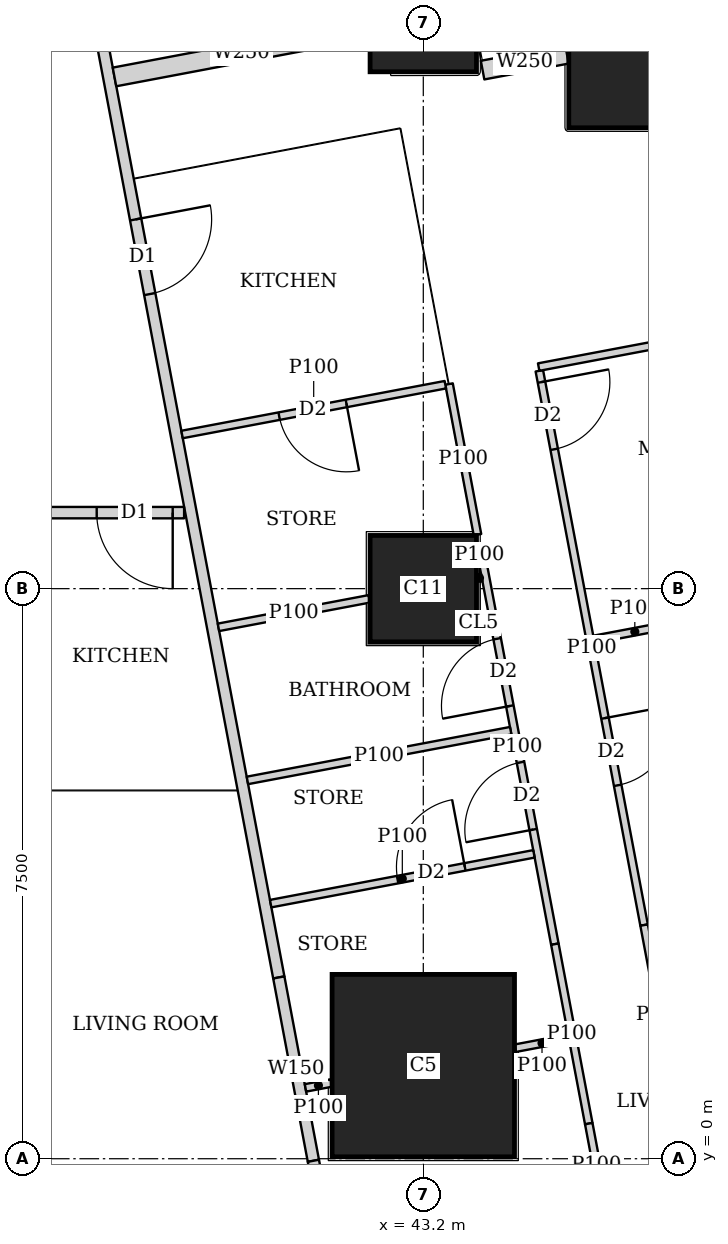
"""IFC4 building model, lengths in metres.
Left out: names, types, materials, properties, quantities, classifications, styles, units other than length and angle.
Written with IfcOpenShell. Run it as: python <this file> out.ifc"""

import sys

from ifc_helpers import new_model, si_unit, direction, frame, frame_2d, origin, origin_2d, place, context, subcontext, project, spatial, rectangle, extrude, element, fill, save


model = new_model("IFC4")
c1 = context("Model", 3, precision=1e-05, world=origin(), true_north=direction((0.0, 1.0)))
c2 = subcontext(c1, "Body", "Model", "MODEL_VIEW")
j1 = project(units=[si_unit("LENGTHUNIT", "METRE"), si_unit("PLANEANGLEUNIT", "RADIAN")], contexts=[c1])
p1 = place(None, origin())
s1 = spatial("IfcSite", under=j1, at=p1, CompositionType="ELEMENT")
p2 = place(p1, origin())
s2 = spatial("IfcBuilding", under=s1, at=p2, CompositionType="ELEMENT")
p3 = place(p2, frame((0.0, 0.0, 208.7)))
s3 = spatial("IfcBuildingStorey", under=s2, at=p3, CompositionType="ELEMENT", Elevation=208.7)
p4 = place(p3, frame((43.2, 1.225, 0.0), z_axis=(0.0, 0.0, 1.0), x_axis=(1.0, 0.0, 0.0)))
e1 = element("IfcColumn", 1, at=p4, inside=s3, PredefinedType="COLUMN", context=c2, shape_type="SweptSolid", body=[
    extrude(rectangle(XDim=2.4, YDim=2.4, at=origin_2d()), origin(), (0.0, 0.0, 1.0), 3.75),
])
for number, where, z_axis, x_axis in (
    (2, (43.2, 7.5, 0.0), (0.0, 0.0, 1.0), (1.0, 0.0, 0.0)),
    (3, (43.2, 15.0, 0.0), (0.0, 0.0, 1.0), (1.0, 0.0, 0.0)),
):
    element("IfcColumn", number, at=place(p3, frame(where, z_axis=z_axis, x_axis=x_axis)), inside=s3, PredefinedType="COLUMN", context=c2, shape_type="SweptSolid", body=[
        extrude(rectangle(XDim=1.4, YDim=1.4, at=origin_2d()), origin(), (0.0, 0.0, 1.0), 3.75),
    ])
p5 = place(p3, frame((46.314, 14.763, 0.0), z_axis=(0.0, 0.0, 1.0), x_axis=(1.0, 0.0, 0.0)))
e4 = element("IfcColumn", 4, at=p5, inside=s3, PredefinedType="COLUMN", context=c2, shape_type="SweptSolid", body=[
    extrude(rectangle(XDim=2.4, YDim=2.4, at=origin_2d()), origin(), (0.0, 0.0, 1.0), 3.75),
])
p6 = place(p3, frame((50.653, 2.703, 0.0), z_axis=(0.0, 0.0, 1.0), x_axis=(-0.185612026696, 0.982623109613, 0.0)))
e5 = element("IfcWall", 5, at=p6, inside=s3, PredefinedType="SOLIDWALL", context=c2, shape_type="SweptSolid", body=[
    extrude(rectangle(XDim=41.393, YDim=0.2, at=frame_2d((20.697, 0.0))), origin(), (0.0, 0.0, 1.0), 3.5),
])
p7 = place(p6, frame((1.633, 0.0, 0.9)))
e6 = element("IfcOpeningElement", 6, at=p7, cuts=e5, PredefinedType="OPENING", context=c2, shape_type="SweptSolid", body=[
    extrude(rectangle(XDim=1.8, YDim=1.5, at=frame_2d((0.9, 0.75))), frame((0.0, 0.11, 0.0), z_axis=(0.0, -1.0, 0.0), x_axis=(1.0, 0.0, 0.0)), (0.0, 0.0, 1.0), 0.22),
])
p8 = place(p6, frame((6.032, 0.0, 0.9)))
e7 = element("IfcOpeningElement", 7, at=p8, cuts=e5, PredefinedType="OPENING", context=c2, shape_type="SweptSolid", body=[
    extrude(rectangle(XDim=1.8, YDim=1.5, at=frame_2d((0.9, 0.75))), frame((0.0, 0.11, 0.0), z_axis=(0.0, -1.0, 0.0), x_axis=(1.0, 0.0, 0.0)), (0.0, 0.0, 1.0), 0.22),
])
p9 = place(p6, frame((9.848, 0.0, 0.9)))
e8 = element("IfcOpeningElement", 8, at=p9, cuts=e5, PredefinedType="OPENING", context=c2, shape_type="SweptSolid", body=[
    extrude(rectangle(XDim=1.8, YDim=1.5, at=frame_2d((0.9, 0.75))), frame((0.0, 0.11, 0.0), z_axis=(0.0, -1.0, 0.0), x_axis=(1.0, 0.0, 0.0)), (0.0, 0.0, 1.0), 0.22),
])
p10 = place(p6, frame((13.664, 0.0, 0.9)))
e9 = element("IfcOpeningElement", 9, at=p10, cuts=e5, PredefinedType="OPENING", context=c2, shape_type="SweptSolid", body=[
    extrude(rectangle(XDim=1.8, YDim=1.5, at=frame_2d((0.9, 0.75))), frame((0.0, 0.11, 0.0), z_axis=(0.0, -1.0, 0.0), x_axis=(1.0, 0.0, 0.0)), (0.0, 0.0, 1.0), 0.22),
])
p11 = place(p6, frame((17.481, 0.0, 0.9)))
e10 = element("IfcOpeningElement", 10, at=p11, cuts=e5, PredefinedType="OPENING", context=c2, shape_type="SweptSolid", body=[
    extrude(rectangle(XDim=1.8, YDim=1.5, at=frame_2d((0.9, 0.75))), frame((0.0, 0.11, 0.0), z_axis=(0.0, -1.0, 0.0), x_axis=(1.0, 0.0, 0.0)), (0.0, 0.0, 1.0), 0.22),
])
p12 = place(p6, frame((21.297, 0.0, 0.9)))
e11 = element("IfcOpeningElement", 11, at=p12, cuts=e5, PredefinedType="OPENING", context=c2, shape_type="SweptSolid", body=[
    extrude(rectangle(XDim=1.8, YDim=1.5, at=frame_2d((0.9, 0.75))), frame((0.0, 0.11, 0.0), z_axis=(0.0, -1.0, 0.0), x_axis=(1.0, 0.0, 0.0)), (0.0, 0.0, 1.0), 0.22),
])
p13 = place(p6, frame((25.113, 0.0, 0.9)))
e12 = element("IfcOpeningElement", 12, at=p13, cuts=e5, PredefinedType="OPENING", context=c2, shape_type="SweptSolid", body=[
    extrude(rectangle(XDim=1.8, YDim=1.5, at=frame_2d((0.9, 0.75))), frame((0.0, 0.11, 0.0), z_axis=(0.0, -1.0, 0.0), x_axis=(1.0, 0.0, 0.0)), (0.0, 0.0, 1.0), 0.22),
])
p14 = place(p6, frame((28.93, 0.0, 0.9)))
e13 = element("IfcOpeningElement", 13, at=p14, cuts=e5, PredefinedType="OPENING", context=c2, shape_type="SweptSolid", body=[
    extrude(rectangle(XDim=1.8, YDim=1.5, at=frame_2d((0.9, 0.75))), frame((0.0, 0.11, 0.0), z_axis=(0.0, -1.0, 0.0), x_axis=(1.0, 0.0, 0.0)), (0.0, 0.0, 1.0), 0.22),
])
p15 = place(p6, frame((32.746, 0.0, 0.9)))
e14 = element("IfcOpeningElement", 14, at=p15, cuts=e5, PredefinedType="OPENING", context=c2, shape_type="SweptSolid", body=[
    extrude(rectangle(XDim=1.8, YDim=1.5, at=frame_2d((0.9, 0.75))), frame((0.0, 0.11, 0.0), z_axis=(0.0, -1.0, 0.0), x_axis=(1.0, 0.0, 0.0)), (0.0, 0.0, 1.0), 0.22),
])
p16 = place(p6, frame((36.481, 0.0, 0.9)))
e15 = element("IfcOpeningElement", 15, at=p16, cuts=e5, PredefinedType="OPENING", context=c2, shape_type="SweptSolid", body=[
    extrude(rectangle(XDim=1.8, YDim=1.5, at=frame_2d((0.9, 0.75))), frame((0.0, 0.11, 0.0), z_axis=(0.0, -1.0, 0.0), x_axis=(1.0, 0.0, 0.0)), (0.0, 0.0, 1.0), 0.22),
])
p17 = place(p3, frame((40.053, 8.5, 0.0), z_axis=(0.0, 0.0, 1.0), x_axis=(-1.0, 0.0, 0.0)))
e16 = element("IfcWall", 16, at=p17, inside=s3, PredefinedType="SOLIDWALL", context=c2, shape_type="SweptSolid", body=[
    extrude(rectangle(XDim=31.052, YDim=0.15, at=frame_2d((15.526, 0.0))), origin(), (0.0, 0.0, 1.0), 3.5),
])
p18 = place(p17, frame((29.178, 0.0, 0.0)))
e17 = element("IfcOpeningElement", 17, at=p18, cuts=e16, PredefinedType="OPENING", context=c2, shape_type="SweptSolid", body=[
    extrude(rectangle(XDim=1.0, YDim=2.1, at=frame_2d((0.5, 1.05))), frame((0.0, 0.085, 0.0), z_axis=(0.0, -1.0, 0.0), x_axis=(1.0, 0.0, 0.0)), (0.0, 0.0, 1.0), 0.17),
])
p19 = place(p17, frame((19.953, 0.0, 0.0)))
e18 = element("IfcOpeningElement", 18, at=p19, cuts=e16, PredefinedType="OPENING", context=c2, shape_type="SweptSolid", body=[
    extrude(rectangle(XDim=1.0, YDim=2.1, at=frame_2d((0.5, 1.05))), frame((0.0, 0.085, 0.0), z_axis=(0.0, -1.0, 0.0), x_axis=(1.0, 0.0, 0.0)), (0.0, 0.0, 1.0), 0.17),
])
p20 = place(p17, frame((12.753, 0.0, 0.0)))
e19 = element("IfcOpeningElement", 19, at=p20, cuts=e16, PredefinedType="OPENING", context=c2, shape_type="SweptSolid", body=[
    extrude(rectangle(XDim=1.0, YDim=2.1, at=frame_2d((0.5, 1.05))), frame((0.0, 0.085, 0.0), z_axis=(0.0, -1.0, 0.0), x_axis=(1.0, 0.0, 0.0)), (0.0, 0.0, 1.0), 0.17),
])
p21 = place(p17, frame((0.15, 0.0, 0.0)))
e20 = element("IfcOpeningElement", 20, at=p21, cuts=e16, PredefinedType="OPENING", context=c2, shape_type="SweptSolid", body=[
    extrude(rectangle(XDim=1.0, YDim=2.1, at=frame_2d((0.5, 1.05))), frame((0.0, 0.085, 0.0), z_axis=(0.0, -1.0, 0.0), x_axis=(1.0, 0.0, 0.0)), (0.0, 0.0, 1.0), 0.17),
])
p22 = place(p3, frame((33.68, 42.723, 0.0), z_axis=(0.0, 0.0, 1.0), x_axis=(0.185601160014, -0.982625162207, 0.0)))
e21 = element("IfcWall", 21, at=p22, inside=s3, PredefinedType="SOLIDWALL", context=c2, shape_type="SweptSolid", body=[
    extrude(rectangle(XDim=41.051, YDim=0.15, at=frame_2d((20.526, 0.0))), origin(), (0.0, 0.0, 1.0), 2.5),
])
p23 = place(p22, frame((12.307, 0.0, 0.0)))
e22 = element("IfcOpeningElement", 22, at=p23, cuts=e21, PredefinedType="OPENING", context=c2, shape_type="SweptSolid", body=[
    extrude(rectangle(XDim=1.0, YDim=2.1, at=frame_2d((0.5, 1.05))), frame((0.0, 0.085, 0.0), z_axis=(0.0, -1.0, 0.0), x_axis=(1.0, 0.0, 0.0)), (0.0, 0.0, 1.0), 0.17),
])
p24 = place(p22, frame((16.123, 0.0, 0.0)))
e23 = element("IfcOpeningElement", 23, at=p24, cuts=e21, PredefinedType="OPENING", context=c2, shape_type="SweptSolid", body=[
    extrude(rectangle(XDim=1.0, YDim=2.1, at=frame_2d((0.5, 1.05))), frame((0.0, 0.085, 0.0), z_axis=(0.0, -1.0, 0.0), x_axis=(1.0, 0.0, 0.0)), (0.0, 0.0, 1.0), 0.17),
])
p25 = place(p22, frame((30.902, 0.0, 0.0)))
e24 = element("IfcOpeningElement", 24, at=p25, cuts=e21, PredefinedType="OPENING", context=c2, shape_type="SweptSolid", body=[
    extrude(rectangle(XDim=1.0, YDim=2.1, at=frame_2d((0.5, 1.05))), frame((0.0, 0.085, 0.0), z_axis=(0.0, -1.0, 0.0), x_axis=(1.0, 0.0, 0.0)), (0.0, 0.0, 1.0), 0.17),
])
p26 = place(p3, frame((41.299, 2.385, 0.0), z_axis=(0.0, 0.0, 1.0), x_axis=(0.18529731833, -0.982682504077, 0.0)))
e25 = element("IfcWall", 25, at=p26, inside=s3, PredefinedType="SOLIDWALL", context=c2, shape_type="SweptSolid", body=[
    extrude(rectangle(XDim=2.455, YDim=0.15, at=frame_2d((1.227, 0.0))), origin(), (0.0, 0.0, 1.0), 2.05),
])
p27 = place(p3, frame((41.754, -0.027, 0.0), z_axis=(0.0, 0.0, 1.0), x_axis=(0.186404157015, -0.982473149886, 0.0)))
e26 = element("IfcWall", 26, at=p27, inside=s3, PredefinedType="SOLIDWALL", context=c2, shape_type="SweptSolid", body=[
    extrude(rectangle(XDim=0.634, YDim=0.15, at=frame_2d((0.317, 0.0))), origin(), (0.0, 0.0, 1.0), 3.5),
])
p28 = place(p3, frame((44.727, 10.366, 0.0), z_axis=(0.0, 0.0, 1.0), x_axis=(0.185678775129, -0.982610498858, 0.0)))
e27 = element("IfcWall", 27, at=p28, inside=s3, PredefinedType="PARTITIONING", context=c2, shape_type="SweptSolid", body=[
    extrude(rectangle(XDim=7.421, YDim=0.1, at=frame_2d((3.71, 0.0))), origin(), (0.0, 0.0, 1.0), 3.5),
])
p29 = place(p28, frame((0.151, 0.0, 0.0)))
e28 = element("IfcOpeningElement", 28, at=p29, cuts=e27, PredefinedType="OPENING", context=c2, shape_type="SweptSolid", body=[
    extrude(rectangle(XDim=0.9, YDim=2.1, at=frame_2d((0.45, 1.05))), frame((0.0, 0.06, 0.0), z_axis=(0.0, -1.0, 0.0), x_axis=(1.0, 0.0, 0.0)), (0.0, 0.0, 1.0), 0.12),
])
p30 = place(p28, frame((4.65, 0.0, 0.0)))
e29 = element("IfcOpeningElement", 29, at=p30, cuts=e27, PredefinedType="OPENING", context=c2, shape_type="SweptSolid", body=[
    extrude(rectangle(XDim=0.9, YDim=2.1, at=frame_2d((0.45, 1.05))), frame((0.0, 0.06, 0.0), z_axis=(0.0, -1.0, 0.0), x_axis=(1.0, 0.0, 0.0)), (0.0, 0.0, 1.0), 0.12),
])
p31 = place(p3, frame((46.105, 3.074, 0.0), z_axis=(0.0, 0.0, 1.0), x_axis=(0.185631845838, -0.982619365681, 0.0)))
e30 = element("IfcWall", 30, at=p31, inside=s3, PredefinedType="PARTITIONING", context=c2, shape_type="SweptSolid", body=[
    extrude(rectangle(XDim=2.403, YDim=0.1, at=frame_2d((1.201, 0.0))), origin(), (0.0, 0.0, 1.0), 2.05),
])
p32 = place(p3, frame((43.539, 10.192, 0.0), z_axis=(0.0, 0.0, 1.0), x_axis=(0.185443145218, -0.982654995353, 0.0)))
e31 = element("IfcWall", 31, at=p32, inside=s3, PredefinedType="PARTITIONING", context=c2, shape_type="SweptSolid", body=[
    extrude(rectangle(XDim=2.017, YDim=0.1, at=frame_2d((1.008, 0.0))), origin(), (0.0, 0.0, 1.0), 3.5),
])
p33 = place(p3, frame((43.949, 8.02, 0.0), z_axis=(0.0, 0.0, 1.0), x_axis=(0.185656792073, -0.982614652627, 0.0)))
e32 = element("IfcWall", 32, at=p33, inside=s3, PredefinedType="PARTITIONING", context=c2, shape_type="SweptSolid", body=[
    extrude(rectangle(XDim=5.289, YDim=0.1, at=frame_2d((2.645, 0.0))), origin(), (0.0, 0.0, 1.0), 3.5),
])
p34 = place(p33, frame((1.2, 0.0, 0.0)))
e33 = element("IfcOpeningElement", 33, at=p34, cuts=e32, PredefinedType="OPENING", context=c2, shape_type="SweptSolid", body=[
    extrude(rectangle(XDim=0.9, YDim=2.1, at=frame_2d((0.45, 1.05))), frame((0.0, 0.06, 0.0), z_axis=(0.0, -1.0, 0.0), x_axis=(1.0, 0.0, 0.0)), (0.0, 0.0, 1.0), 0.12),
])
p35 = place(p33, frame((2.855, 0.0, 0.0)))
e34 = element("IfcOpeningElement", 34, at=p35, cuts=e32, PredefinedType="OPENING", context=c2, shape_type="SweptSolid", body=[
    extrude(rectangle(XDim=0.9, YDim=2.1, at=frame_2d((0.45, 1.05))), frame((0.0, 0.06, 0.0), z_axis=(0.0, -1.0, 0.0), x_axis=(1.0, 0.0, 0.0)), (0.0, 0.0, 1.0), 0.12),
])
p36 = place(p3, frame((44.931, 2.823, 0.0), z_axis=(0.0, 0.0, 1.0), x_axis=(0.185631845838, -0.982619365681, 0.0)))
e35 = element("IfcWall", 35, at=p36, inside=s3, PredefinedType="PARTITIONING", context=c2, shape_type="SweptSolid", body=[
    extrude(rectangle(XDim=2.403, YDim=0.1, at=frame_2d((1.201, 0.0))), origin(), (0.0, 0.0, 1.0), 2.05),
])
p37 = place(p3, frame((45.377, 0.462, 0.0), z_axis=(0.0, 0.0, 1.0), x_axis=(0.185513480919, -0.982641719243, 0.0)))
e36 = element("IfcWall", 36, at=p37, inside=s3, PredefinedType="PARTITIONING", context=c2, shape_type="SweptSolid", body=[
    extrude(rectangle(XDim=1.095, YDim=0.1, at=frame_2d((0.547, 0.0))), origin(), (0.0, 0.0, 1.0), 3.5),
])
p38 = place(p3, frame((48.943, 11.213, 0.0), z_axis=(0.0, 0.0, 1.0), x_axis=(-0.982633535512, -0.185556823879, 0.0)))
e37 = element("IfcWall", 37, at=p38, inside=s3, PredefinedType="PARTITIONING", context=c2, shape_type="SweptSolid", body=[
    extrude(rectangle(XDim=4.3, YDim=0.1, at=frame_2d((2.15, 0.0))), origin(), (0.0, 0.0, 1.0), 2.05),
])
p39 = place(p3, frame((46.52, 7.035, 0.0), z_axis=(0.0, 0.0, 1.0), x_axis=(-0.982620932907, -0.185623549726, 0.0)))
e38 = element("IfcWall", 38, at=p39, inside=s3, PredefinedType="PARTITIONING", context=c2, shape_type="SweptSolid", body=[
    extrude(rectangle(XDim=1.093, YDim=0.1, at=frame_2d((0.546, 0.0))), origin(), (0.0, 0.0, 1.0), 3.5),
])
p40 = place(p3, frame((43.49, 10.183, 0.0), z_axis=(0.0, 0.0, 1.0), x_axis=(-0.982588017646, -0.185797706064, 0.0)))
e39 = element("IfcWall", 39, at=p40, inside=s3, PredefinedType="PARTITIONING", context=c2, shape_type="SweptSolid", body=[
    extrude(rectangle(XDim=3.525, YDim=0.1, at=frame_2d((1.763, 0.0))), origin(), (0.0, 0.0, 1.0), 3.5),
])
p41 = place(p40, frame((1.325, 0.0, 0.0)))
e40 = element("IfcOpeningElement", 40, at=p41, cuts=e39, PredefinedType="OPENING", context=c2, shape_type="SweptSolid", body=[
    extrude(rectangle(XDim=0.9, YDim=2.1, at=frame_2d((0.45, 1.05))), frame((0.0, 0.06, 0.0), z_axis=(0.0, -1.0, 0.0), x_axis=(1.0, 0.0, 0.0)), (0.0, 0.0, 1.0), 0.12),
])
p42 = place(p3, frame((43.969, 7.646, 0.0), z_axis=(0.0, 0.0, 1.0), x_axis=(-0.983147034646, -0.182816597351, 0.0)))
e41 = element("IfcWall", 41, at=p42, inside=s3, PredefinedType="PARTITIONING", context=c2, shape_type="SweptSolid", body=[
    extrude(rectangle(XDim=0.06, YDim=0.1, at=frame_2d((0.03, 0.0))), origin(), (0.0, 0.0, 1.0), 3.5),
])
p43 = place(p3, frame((42.49, 7.366, 0.0), z_axis=(0.0, 0.0, 1.0), x_axis=(-0.982620917875, -0.185623629302, 0.0)))
e42 = element("IfcWall", 42, at=p43, inside=s3, PredefinedType="PARTITIONING", context=c2, shape_type="SweptSolid", body=[
    extrude(rectangle(XDim=2.02, YDim=0.1, at=frame_2d((1.01, 0.0))), origin(), (0.0, 0.0, 1.0), 3.5),
])
p44 = place(p3, frame((45.114, 1.587, 0.0), z_axis=(0.0, 0.0, 1.0), x_axis=(-0.982671022916, -0.185358195723, 0.0)))
e43 = element("IfcWall", 43, at=p44, inside=s3, PredefinedType="PARTITIONING", context=c2, shape_type="SweptSolid", body=[
    extrude(rectangle(XDim=0.717, YDim=0.1, at=frame_2d((0.358, 0.0))), origin(), (0.0, 0.0, 1.0), 2.05),
])
p45 = place(p3, frame((41.99, 0.996, 0.0), z_axis=(0.0, 0.0, 1.0), x_axis=(-0.982639822555, -0.185523527159, 0.0)))
e44 = element("IfcWall", 44, at=p45, inside=s3, PredefinedType="PARTITIONING", context=c2, shape_type="SweptSolid", body=[
    extrude(rectangle(XDim=0.346, YDim=0.1, at=frame_2d((0.173, 0.0))), origin(), (0.0, 0.0, 1.0), 2.05),
])
p46 = place(p3, frame((44.35, 5.631, 0.0), z_axis=(0.0, 0.0, 1.0), x_axis=(-0.982638553676, -0.185530247748, 0.0)))
e45 = element("IfcWall", 45, at=p46, inside=s3, PredefinedType="PARTITIONING", context=c2, shape_type="SweptSolid", body=[
    extrude(rectangle(XDim=3.525, YDim=0.1, at=frame_2d((1.763, 0.0))), origin(), (0.0, 0.0, 1.0), 3.5),
])
p47 = place(p3, frame((45.09, 14.531, 0.0), z_axis=(0.0, 0.0, 1.0), x_axis=(-0.982737354171, -0.185006196431, 0.0)))
e46 = element("IfcWall", 46, at=p47, inside=s3, PredefinedType="SOLIDWALL", context=c2, shape_type="SweptSolid", body=[
    extrude(rectangle(XDim=1.13, YDim=0.25, at=frame_2d((0.565, 0.0))), origin(), (0.0, 0.0, 1.0), 2.05),
])
p48 = place(p3, frame((42.476, 14.863, 0.0), z_axis=(0.0, 0.0, 1.0), x_axis=(-0.982603567712, -0.185715450942, 0.0)))
e47 = element("IfcWall", 47, at=p48, inside=s3, PredefinedType="SOLIDWALL", context=c2, shape_type="SweptSolid", body=[
    extrude(rectangle(XDim=3.398, YDim=0.25, at=frame_2d((1.699, 0.0))), origin(), (0.0, 0.0, 1.0), 3.5),
])
p49 = place(p3, frame((41.192, 3.356, 0.0), z_axis=(0.0, 0.0, 1.0), x_axis=(0.982588017646, 0.185797706064, 0.0)))
e48 = element("IfcWall", 48, at=p49, inside=s3, PredefinedType="PARTITIONING", context=c2, shape_type="SweptSolid", body=[
    extrude(rectangle(XDim=3.525, YDim=0.1, at=frame_2d((1.763, 0.0))), origin(), (0.0, 0.0, 1.0), 3.5),
])
p50 = place(p49, frame((1.7, 0.0, 0.0)))
e49 = element("IfcOpeningElement", 49, at=p50, cuts=e48, PredefinedType="OPENING", context=c2, shape_type="SweptSolid", body=[
    extrude(rectangle(XDim=0.9, YDim=2.1, at=frame_2d((0.45, 1.05))), frame((0.0, 0.06, 0.0), z_axis=(0.0, -1.0, 0.0), x_axis=(1.0, 0.0, 0.0)), (0.0, 0.0, 1.0), 0.12),
])
p51 = place(p21, origin())
e50 = element("IfcDoor", 50, at=p51, inside=s3, OperationType="SINGLE_SWING_LEFT", PredefinedType="DOOR", context=c2, shape_type="SweptSolid", body=[
    extrude(rectangle(XDim=1.0, YDim=2.1, at=frame_2d((0.5, 1.05))), frame((0.0, 0.025, 0.0), z_axis=(0.0, -1.0, 0.0), x_axis=(1.0, 0.0, 0.0)), (0.0, 0.0, 1.0), 0.05),
])
fill(e20, e50)
p52 = place(p29, origin())
e51 = element("IfcDoor", 51, at=p52, inside=s3, OperationType="SINGLE_SWING_LEFT", PredefinedType="DOOR", context=c2, shape_type="SweptSolid", body=[
    extrude(rectangle(XDim=0.9, YDim=2.1, at=frame_2d((0.45, 1.05))), frame((0.0, 0.025, 0.0), z_axis=(0.0, -1.0, 0.0), x_axis=(1.0, 0.0, 0.0)), (0.0, 0.0, 1.0), 0.05),
])
fill(e28, e51)
p53 = place(p30, origin())
e52 = element("IfcDoor", 52, at=p53, inside=s3, OperationType="SINGLE_SWING_LEFT", PredefinedType="DOOR", context=c2, shape_type="SweptSolid", body=[
    extrude(rectangle(XDim=0.9, YDim=2.1, at=frame_2d((0.45, 1.05))), frame((0.0, 0.025, 0.0), z_axis=(0.0, -1.0, 0.0), x_axis=(1.0, 0.0, 0.0)), (0.0, 0.0, 1.0), 0.05),
])
fill(e29, e52)
p54 = place(p34, origin())
e53 = element("IfcDoor", 53, at=p54, inside=s3, OperationType="SINGLE_SWING_LEFT", PredefinedType="DOOR", context=c2, shape_type="SweptSolid", body=[
    extrude(rectangle(XDim=0.9, YDim=2.1, at=frame_2d((0.45, 1.05))), frame((0.0, 0.025, 0.0), z_axis=(0.0, -1.0, 0.0), x_axis=(1.0, 0.0, 0.0)), (0.0, 0.0, 1.0), 0.05),
])
fill(e33, e53)
p55 = place(p35, origin())
e54 = element("IfcDoor", 54, at=p55, inside=s3, OperationType="SINGLE_SWING_LEFT", PredefinedType="DOOR", context=c2, shape_type="SweptSolid", body=[
    extrude(rectangle(XDim=0.9, YDim=2.1, at=frame_2d((0.45, 1.05))), frame((0.0, 0.025, 0.0), z_axis=(0.0, -1.0, 0.0), x_axis=(1.0, 0.0, 0.0)), (0.0, 0.0, 1.0), 0.05),
])
fill(e34, e54)
p56 = place(p25, origin())
e55 = element("IfcDoor", 55, at=p56, inside=s3, OperationType="SINGLE_SWING_LEFT", PredefinedType="DOOR", context=c2, shape_type="SweptSolid", body=[
    extrude(rectangle(XDim=1.0, YDim=2.1, at=frame_2d((0.5, 1.05))), frame((0.0, 0.025, 0.0), z_axis=(0.0, -1.0, 0.0), x_axis=(1.0, 0.0, 0.0)), (0.0, 0.0, 1.0), 0.05),
])
fill(e24, e55)
p57 = place(p41, origin())
e56 = element("IfcDoor", 56, at=p57, inside=s3, OperationType="SINGLE_SWING_LEFT", PredefinedType="DOOR", context=c2, shape_type="SweptSolid", body=[
    extrude(rectangle(XDim=0.9, YDim=2.1, at=frame_2d((0.45, 1.05))), frame((0.0, 0.025, 0.0), z_axis=(0.0, -1.0, 0.0), x_axis=(1.0, 0.0, 0.0)), (0.0, 0.0, 1.0), 0.05),
])
fill(e40, e56)
p58 = place(p50, origin())
e57 = element("IfcDoor", 57, at=p58, inside=s3, OperationType="SINGLE_SWING_RIGHT", PredefinedType="DOOR", context=c2, shape_type="SweptSolid", body=[
    extrude(rectangle(XDim=0.9, YDim=2.1, at=frame_2d((0.45, 1.05))), frame((0.0, 0.025, 0.0), z_axis=(0.0, -1.0, 0.0), x_axis=(1.0, 0.0, 0.0)), (0.0, 0.0, 1.0), 0.05),
])
fill(e49, e57)
save(model, sys.argv[1])
